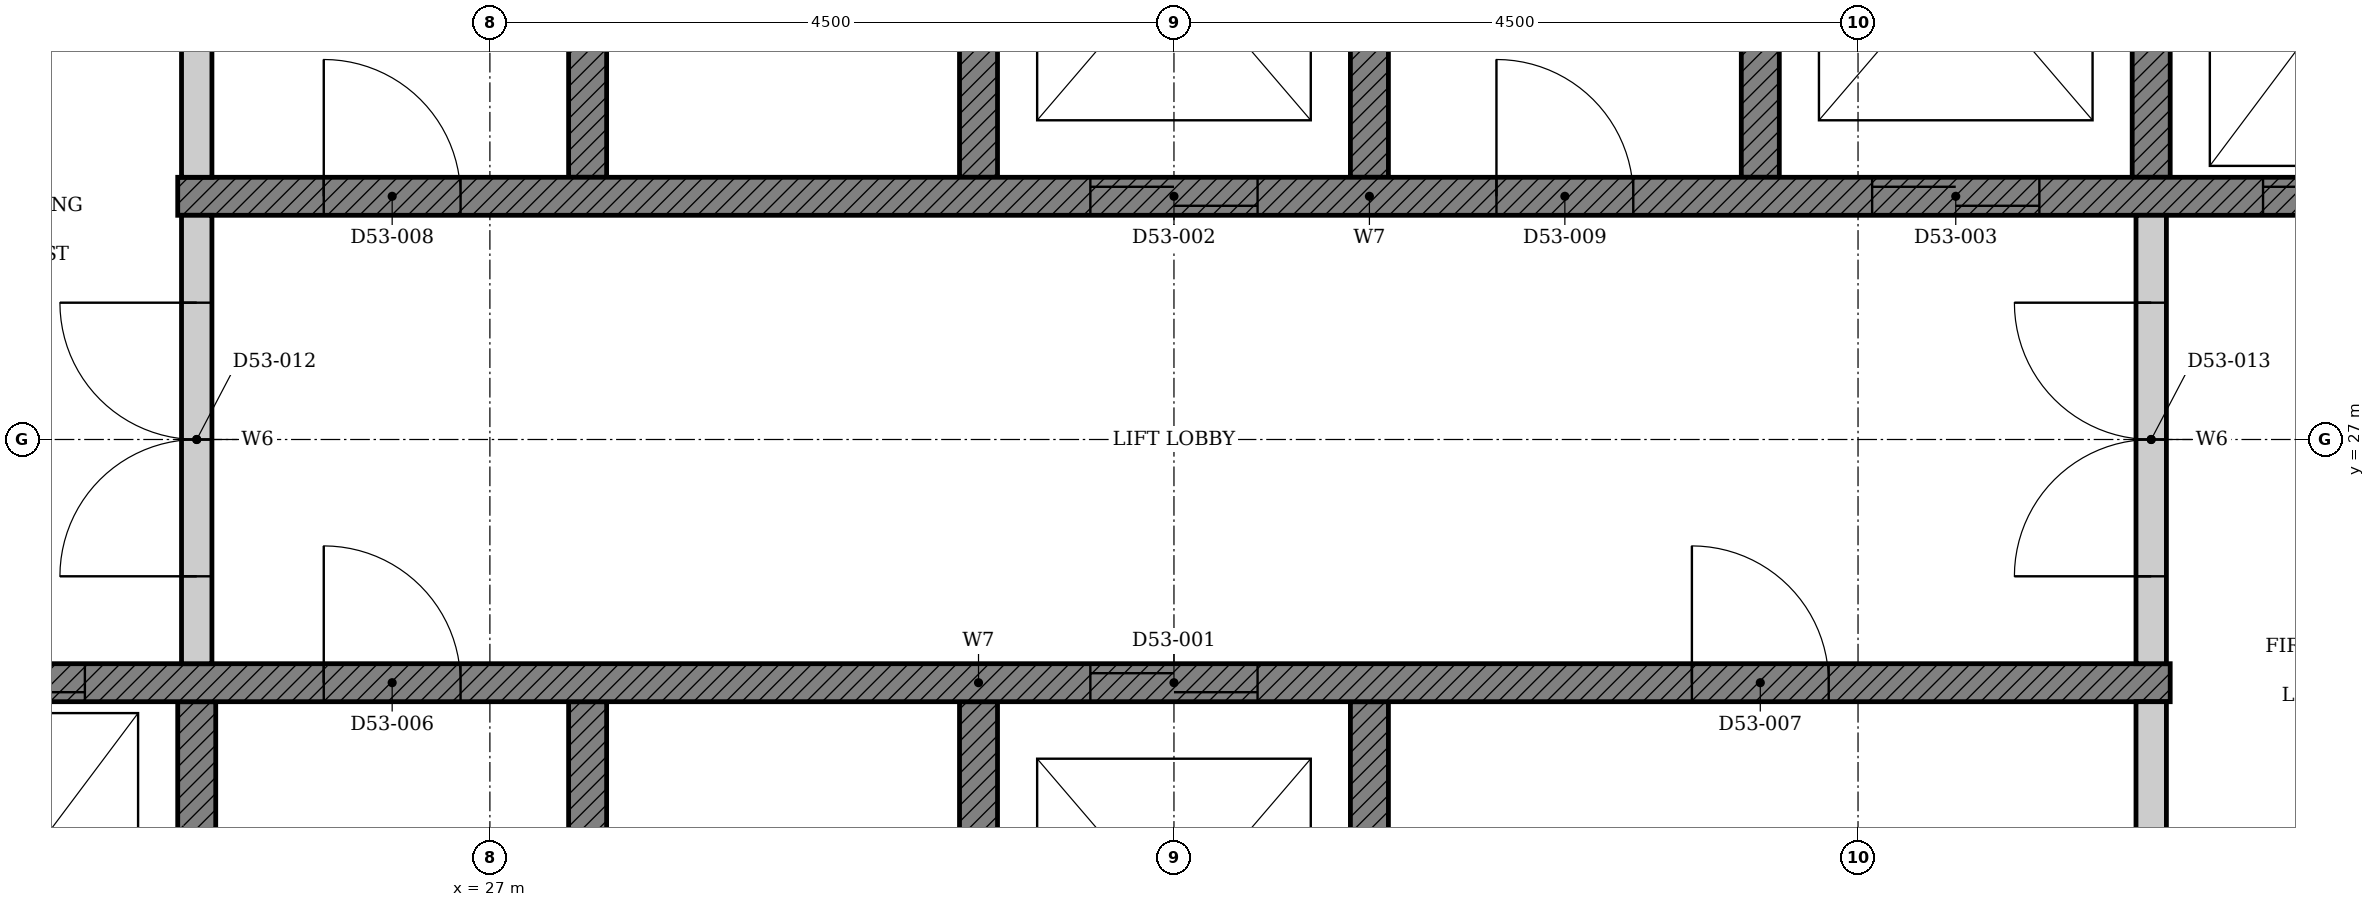
"""IFC4 building model, lengths in metres.
Left out: names, types, materials, properties, quantities, classifications, styles, units other than length and angle.
Written with IfcOpenShell. Run it as: python <this file> out.ifc"""

import sys

from ifc_helpers import new_model, si_unit, direction, frame, frame_2d, origin, place, context, subcontext, project, spatial, polyline, rectangle, outline, extrude, element, fill, save


model = new_model("IFC4")
c1 = context("Model", 3, precision=1e-05, world=origin(), true_north=direction((0.0, 1.0)))
c2 = subcontext(c1, "Body", "Model", "MODEL_VIEW")
j1 = project(units=[si_unit("LENGTHUNIT", "METRE"), si_unit("PLANEANGLEUNIT", "RADIAN")], contexts=[c1])
p1 = place(None, origin())
s1 = spatial("IfcSite", under=j1, at=p1, CompositionType="ELEMENT")
p2 = place(p1, origin())
s2 = spatial("IfcBuilding", under=s1, at=p2, CompositionType="ELEMENT")
p3 = place(p2, frame((0.0, 0.0, 210.9)))
s3 = spatial("IfcBuildingStorey", under=s2, at=p3, CompositionType="ELEMENT", Elevation=210.9)
p4 = place(p3, origin())
e1 = element("IfcWall", 1, at=p4, inside=s3, PredefinedType="SHEAR", context=c2, shape_type="SweptSolid", body=[
    extrude(outline(polyline([(22.375, 22.35), (25.197, 22.35), (25.197, 25.275), (24.947, 25.275), (24.947, 22.65), (22.625, 22.65), (22.625, 25.275), (22.375, 25.275), (22.375, 22.35)])), origin(), (0.0, 0.0, 1.0), 3.4),
])
p5 = place(p3, origin())
e2 = element("IfcWall", 2, at=p5, inside=s3, PredefinedType="SHEAR", context=c2, shape_type="SweptSolid", body=[
    extrude(outline(polyline([(27.518, 22.35), (32.911, 22.35), (32.911, 25.275), (32.661, 25.275), (32.661, 22.65), (30.339, 22.65), (30.339, 25.275), (30.089, 25.275), (30.089, 22.65), (27.768, 22.65), (27.768, 25.275), (27.518, 25.275), (27.518, 22.35)])), origin(), (0.0, 0.0, 1.0), 3.4),
])
p6 = place(p3, origin())
e3 = element("IfcWall", 3, at=p6, inside=s3, PredefinedType="SHEAR", context=c2, shape_type="SweptSolid", body=[
    extrude(outline(polyline([(27.518, 28.725), (27.768, 28.725), (27.768, 31.35), (30.089, 31.35), (30.089, 28.725), (30.339, 28.725), (30.339, 31.35), (32.661, 31.35), (32.661, 28.725), (32.911, 28.725), (32.911, 31.65), (27.518, 31.65), (27.518, 28.725)])), origin(), (0.0, 0.0, 1.0), 3.4),
])
p7 = place(p3, origin())
e4 = element("IfcWall", 4, at=p7, inside=s3, PredefinedType="SHEAR", context=c2, shape_type="SweptSolid", body=[
    extrude(outline(polyline([(35.232, 28.725), (35.482, 28.725), (35.482, 31.35), (37.803, 31.35), (37.803, 28.725), (38.053, 28.725), (38.053, 31.35), (40.375, 31.35), (40.375, 28.725), (40.625, 28.725), (40.625, 31.65), (35.232, 31.65), (35.232, 28.725)])), origin(), (0.0, 0.0, 1.0), 3.4),
])
p8 = place(p3, frame((22.375, 25.4, 0.0), z_axis=(0.0, 0.0, 1.0), x_axis=(1.0, 0.0, 0.0)))
e5 = element("IfcWall", 5, at=p8, inside=s3, PredefinedType="SHEAR", context=c2, shape_type="SweptSolid", body=[
    extrude(rectangle(XDim=15.678, YDim=0.25, at=frame_2d((7.839, 0.0))), origin(), (0.0, 0.0, 1.0), 3.4),
])
p9 = place(p8, frame((8.575, 0.0, 0.0)))
e6 = element("IfcOpeningElement", 6, at=p9, cuts=e5, PredefinedType="OPENING", context=c2, shape_type="SweptSolid", body=[
    extrude(rectangle(XDim=1.1, YDim=2.1, at=frame_2d((0.55, 1.05))), frame((0.0, 0.135, 0.0), z_axis=(0.0, -1.0, 0.0), x_axis=(1.0, 0.0, 0.0)), (0.0, 0.0, 1.0), 0.27),
])
p10 = place(p8, frame((0.861, 0.0, 0.0)))
e7 = element("IfcOpeningElement", 7, at=p10, cuts=e5, PredefinedType="OPENING", context=c2, shape_type="SweptSolid", body=[
    extrude(rectangle(XDim=1.1, YDim=2.1, at=frame_2d((0.55, 1.05))), frame((0.0, 0.135, 0.0), z_axis=(0.0, -1.0, 0.0), x_axis=(1.0, 0.0, 0.0)), (0.0, 0.0, 1.0), 0.27),
])
p11 = place(p8, frame((3.532, 0.0, 0.0)))
e8 = element("IfcOpeningElement", 8, at=p11, cuts=e5, PredefinedType="OPENING", context=c2, shape_type="SweptSolid", body=[
    extrude(rectangle(XDim=0.9, YDim=2.1, at=frame_2d((0.45, 1.05))), frame((0.0, 0.135, 0.0), z_axis=(0.0, -1.0, 0.0), x_axis=(1.0, 0.0, 0.0)), (0.0, 0.0, 1.0), 0.27),
])
p12 = place(p8, frame((12.532, 0.0, 0.0)))
e9 = element("IfcOpeningElement", 9, at=p12, cuts=e5, PredefinedType="OPENING", context=c2, shape_type="SweptSolid", body=[
    extrude(rectangle(XDim=0.9, YDim=2.1, at=frame_2d((0.45, 1.05))), frame((0.0, 0.135, 0.0), z_axis=(0.0, -1.0, 0.0), x_axis=(1.0, 0.0, 0.0)), (0.0, 0.0, 1.0), 0.27),
])
p13 = place(p3, frame((24.947, 28.6, 0.0), z_axis=(0.0, 0.0, 1.0), x_axis=(1.0, 0.0, 0.0)))
e10 = element("IfcWall", 10, at=p13, inside=s3, PredefinedType="SHEAR", context=c2, shape_type="SweptSolid", body=[
    extrude(rectangle(XDim=15.678, YDim=0.25, at=frame_2d((7.839, 0.0))), origin(), (0.0, 0.0, 1.0), 3.4),
])
p14 = place(p13, frame((6.004, 0.0, 0.0)))
e11 = element("IfcOpeningElement", 11, at=p14, cuts=e10, PredefinedType="OPENING", context=c2, shape_type="SweptSolid", body=[
    extrude(rectangle(XDim=1.1, YDim=2.1, at=frame_2d((0.55, 1.05))), frame((0.0, 0.135, 0.0), z_axis=(0.0, -1.0, 0.0), x_axis=(1.0, 0.0, 0.0)), (0.0, 0.0, 1.0), 0.27),
])
p15 = place(p13, frame((11.146, 0.0, 0.0)))
e12 = element("IfcOpeningElement", 12, at=p15, cuts=e10, PredefinedType="OPENING", context=c2, shape_type="SweptSolid", body=[
    extrude(rectangle(XDim=1.1, YDim=2.1, at=frame_2d((0.55, 1.05))), frame((0.0, 0.135, 0.0), z_axis=(0.0, -1.0, 0.0), x_axis=(1.0, 0.0, 0.0)), (0.0, 0.0, 1.0), 0.27),
])
p16 = place(p13, frame((13.718, 0.0, 0.0)))
e13 = element("IfcOpeningElement", 13, at=p16, cuts=e10, PredefinedType="OPENING", context=c2, shape_type="SweptSolid", body=[
    extrude(rectangle(XDim=1.1, YDim=2.1, at=frame_2d((0.55, 1.05))), frame((0.0, 0.135, 0.0), z_axis=(0.0, -1.0, 0.0), x_axis=(1.0, 0.0, 0.0)), (0.0, 0.0, 1.0), 0.27),
])
p17 = place(p13, frame((0.961, 0.0, 0.0)))
e14 = element("IfcOpeningElement", 14, at=p17, cuts=e10, PredefinedType="OPENING", context=c2, shape_type="SweptSolid", body=[
    extrude(rectangle(XDim=0.9, YDim=2.1, at=frame_2d((0.45, 1.05))), frame((0.0, 0.135, 0.0), z_axis=(0.0, -1.0, 0.0), x_axis=(1.0, 0.0, 0.0)), (0.0, 0.0, 1.0), 0.27),
])
p18 = place(p13, frame((8.675, 0.0, 0.0)))
e15 = element("IfcOpeningElement", 15, at=p18, cuts=e10, PredefinedType="OPENING", context=c2, shape_type="SweptSolid", body=[
    extrude(rectangle(XDim=0.9, YDim=2.1, at=frame_2d((0.45, 1.05))), frame((0.0, 0.135, 0.0), z_axis=(0.0, -1.0, 0.0), x_axis=(1.0, 0.0, 0.0)), (0.0, 0.0, 1.0), 0.27),
])
for number, where, z_axis, x_axis in (
    (16, (37.928, 22.65, 0.0), (0.0, 0.0, 1.0), (0.0, 1.0, 0.0)),
    (17, (25.072, 28.725, 0.0), (0.0, 0.0, 1.0), (0.0, 1.0, 0.0)),
):
    element("IfcWall", number, at=place(p3, frame(where, z_axis=z_axis, x_axis=x_axis)), inside=s3, PredefinedType="PARTITIONING", context=c2, shape_type="SweptSolid", body=[
        extrude(rectangle(XDim=2.625, YDim=0.2, at=frame_2d((1.312, 0.0))), origin(), (0.0, 0.0, 1.0), 3.4),
    ])
p19 = place(p3, frame((25.072, 25.525, 0.0), z_axis=(0.0, 0.0, 1.0), x_axis=(0.0, 1.0, 0.0)))
e18 = element("IfcWall", 18, at=p19, inside=s3, PredefinedType="PARTITIONING", context=c2, shape_type="SweptSolid", body=[
    extrude(rectangle(XDim=2.95, YDim=0.2, at=frame_2d((1.475, 0.0))), origin(), (0.0, 0.0, 1.0), 3.4),
])
p20 = place(p19, frame((0.575, 0.0, 0.0)))
e19 = element("IfcOpeningElement", 19, at=p20, cuts=e18, PredefinedType="OPENING", context=c2, shape_type="SweptSolid", body=[
    extrude(rectangle(XDim=1.8, YDim=2.1, at=frame_2d((0.9, 1.05))), frame((0.0, 0.11, 0.0), z_axis=(0.0, -1.0, 0.0), x_axis=(1.0, 0.0, 0.0)), (0.0, 0.0, 1.0), 0.22),
])
p21 = place(p3, frame((37.928, 25.525, 0.0), z_axis=(0.0, 0.0, 1.0), x_axis=(0.0, 1.0, 0.0)))
e20 = element("IfcWall", 20, at=p21, inside=s3, PredefinedType="PARTITIONING", context=c2, shape_type="SweptSolid", body=[
    extrude(rectangle(XDim=2.95, YDim=0.2, at=frame_2d((1.475, 0.0))), origin(), (0.0, 0.0, 1.0), 3.4),
])
p22 = place(p21, frame((0.575, 0.0, 0.0)))
e21 = element("IfcOpeningElement", 21, at=p22, cuts=e20, PredefinedType="OPENING", context=c2, shape_type="SweptSolid", body=[
    extrude(rectangle(XDim=1.8, YDim=2.1, at=frame_2d((0.9, 1.05))), frame((0.0, 0.11, 0.0), z_axis=(0.0, -1.0, 0.0), x_axis=(1.0, 0.0, 0.0)), (0.0, 0.0, 1.0), 0.22),
])
p23 = place(p9, origin())
e22 = element("IfcDoor", 22, at=p23, inside=s3, OperationType="DOUBLE_DOOR_SLIDING", PredefinedType="DOOR", context=c2, shape_type="SweptSolid", body=[
    extrude(rectangle(XDim=1.1, YDim=2.1, at=frame_2d((0.55, 1.05))), frame((0.0, 0.025, 0.0), z_axis=(0.0, -1.0, 0.0), x_axis=(1.0, 0.0, 0.0)), (0.0, 0.0, 1.0), 0.05),
])
fill(e6, e22)
p24 = place(p14, origin())
e23 = element("IfcDoor", 23, at=p24, inside=s3, OperationType="DOUBLE_DOOR_SLIDING", PredefinedType="DOOR", context=c2, shape_type="SweptSolid", body=[
    extrude(rectangle(XDim=1.1, YDim=2.1, at=frame_2d((0.55, 1.05))), frame((0.0, 0.025, 0.0), z_axis=(0.0, -1.0, 0.0), x_axis=(1.0, 0.0, 0.0)), (0.0, 0.0, 1.0), 0.05),
])
fill(e11, e23)
p25 = place(p15, origin())
e24 = element("IfcDoor", 24, at=p25, inside=s3, OperationType="DOUBLE_DOOR_SLIDING", PredefinedType="DOOR", context=c2, shape_type="SweptSolid", body=[
    extrude(rectangle(XDim=1.1, YDim=2.1, at=frame_2d((0.55, 1.05))), frame((0.0, 0.025, 0.0), z_axis=(0.0, -1.0, 0.0), x_axis=(1.0, 0.0, 0.0)), (0.0, 0.0, 1.0), 0.05),
])
fill(e12, e24)
p26 = place(p10, origin())
e25 = element("IfcDoor", 25, at=p26, inside=s3, OperationType="DOUBLE_DOOR_SLIDING", PredefinedType="DOOR", context=c2, shape_type="SweptSolid", body=[
    extrude(rectangle(XDim=1.1, YDim=2.1, at=frame_2d((0.55, 1.05))), frame((0.0, 0.025, 0.0), z_axis=(0.0, -1.0, 0.0), x_axis=(1.0, 0.0, 0.0)), (0.0, 0.0, 1.0), 0.05),
])
fill(e7, e25)
p27 = place(p16, origin())
e26 = element("IfcDoor", 26, at=p27, inside=s3, OperationType="DOUBLE_DOOR_SLIDING", PredefinedType="DOOR", context=c2, shape_type="SweptSolid", body=[
    extrude(rectangle(XDim=1.1, YDim=2.1, at=frame_2d((0.55, 1.05))), frame((0.0, 0.025, 0.0), z_axis=(0.0, -1.0, 0.0), x_axis=(1.0, 0.0, 0.0)), (0.0, 0.0, 1.0), 0.05),
])
fill(e13, e26)
p28 = place(p11, origin())
e27 = element("IfcDoor", 27, at=p28, inside=s3, OperationType="SINGLE_SWING_LEFT", PredefinedType="DOOR", context=c2, shape_type="SweptSolid", body=[
    extrude(rectangle(XDim=0.9, YDim=2.1, at=frame_2d((0.45, 1.05))), frame((0.0, 0.025, 0.0), z_axis=(0.0, -1.0, 0.0), x_axis=(1.0, 0.0, 0.0)), (0.0, 0.0, 1.0), 0.05),
])
fill(e8, e27)
p29 = place(p12, origin())
e28 = element("IfcDoor", 28, at=p29, inside=s3, OperationType="SINGLE_SWING_LEFT", PredefinedType="DOOR", context=c2, shape_type="SweptSolid", body=[
    extrude(rectangle(XDim=0.9, YDim=2.1, at=frame_2d((0.45, 1.05))), frame((0.0, 0.025, 0.0), z_axis=(0.0, -1.0, 0.0), x_axis=(1.0, 0.0, 0.0)), (0.0, 0.0, 1.0), 0.05),
])
fill(e9, e28)
p30 = place(p17, origin())
e29 = element("IfcDoor", 29, at=p30, inside=s3, OperationType="SINGLE_SWING_LEFT", PredefinedType="DOOR", context=c2, shape_type="SweptSolid", body=[
    extrude(rectangle(XDim=0.9, YDim=2.1, at=frame_2d((0.45, 1.05))), frame((0.0, 0.025, 0.0), z_axis=(0.0, -1.0, 0.0), x_axis=(1.0, 0.0, 0.0)), (0.0, 0.0, 1.0), 0.05),
])
fill(e14, e29)
p31 = place(p18, origin())
e30 = element("IfcDoor", 30, at=p31, inside=s3, OperationType="SINGLE_SWING_LEFT", PredefinedType="DOOR", context=c2, shape_type="SweptSolid", body=[
    extrude(rectangle(XDim=0.9, YDim=2.1, at=frame_2d((0.45, 1.05))), frame((0.0, 0.025, 0.0), z_axis=(0.0, -1.0, 0.0), x_axis=(1.0, 0.0, 0.0)), (0.0, 0.0, 1.0), 0.05),
])
fill(e15, e30)
p32 = place(p20, origin())
e31 = element("IfcDoor", 31, at=p32, inside=s3, OperationType="DOUBLE_DOOR_SINGLE_SWING", PredefinedType="DOOR", context=c2, shape_type="SweptSolid", body=[
    extrude(rectangle(XDim=1.8, YDim=2.1, at=frame_2d((0.9, 1.05))), frame((0.0, 0.025, 0.0), z_axis=(0.0, -1.0, 0.0), x_axis=(1.0, 0.0, 0.0)), (0.0, 0.0, 1.0), 0.05),
])
fill(e19, e31)
p33 = place(p22, origin())
e32 = element("IfcDoor", 32, at=p33, inside=s3, OperationType="DOUBLE_DOOR_SINGLE_SWING", PredefinedType="DOOR", context=c2, shape_type="SweptSolid", body=[
    extrude(rectangle(XDim=1.8, YDim=2.1, at=frame_2d((0.9, 1.05))), frame((0.0, 0.025, 0.0), z_axis=(0.0, -1.0, 0.0), x_axis=(1.0, 0.0, 0.0)), (0.0, 0.0, 1.0), 0.05),
])
fill(e21, e32)
save(model, sys.argv[1])
